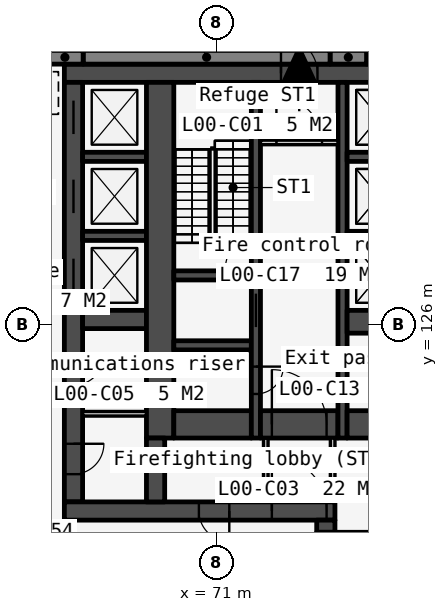
"""IFC4 building model, lengths in metres.
Left out: names, types, materials, properties, quantities, classifications, styles, units other than length and angle.
Written with IfcOpenShell. Run it as: python <this file> out.ifc"""

import sys

from ifc_helpers import new_model, si_unit, direction, frame, frame_2d, origin, place, context, subcontext, project, spatial, polyline, rectangle, outline, extrude, element, fill, save


model = new_model("IFC4")
c1 = context("Model", 3, precision=1e-05, world=origin(), true_north=direction((0.0, 1.0)))
c2 = subcontext(c1, "Body", "Model", "MODEL_VIEW")
j1 = project(units=[si_unit("LENGTHUNIT", "METRE"), si_unit("PLANEANGLEUNIT", "RADIAN")], contexts=[c1])
p1 = place(None, origin())
s1 = spatial("IfcSite", under=j1, at=p1, CompositionType="ELEMENT")
p2 = place(p1, origin())
s2 = spatial("IfcBuilding", under=s1, at=p2, CompositionType="ELEMENT")
p3 = place(p2, origin())
s3 = spatial("IfcBuildingStorey", under=s2, at=p3, CompositionType="ELEMENT", Elevation=0.0)
p4 = place(p3, frame((66.0, 134.25, 0.0), z_axis=(0.0, 0.0, 1.0), x_axis=(1.0, 0.0, 0.0)))
e1 = element("IfcWall", 1, at=p4, inside=s3, PredefinedType="SOLIDWALL", context=c2, shape_type="SweptSolid", body=[
    extrude(rectangle(XDim=28.0, YDim=0.6, at=frame_2d((14.0, 0.0))), origin(), (0.0, 0.0, 1.0), 7.2),
])
p5 = place(p4, frame((7.125, 0.0, 0.0)))
e2 = element("IfcOpeningElement", 2, at=p5, cuts=e1, PredefinedType="OPENING", context=c2, shape_type="SweptSolid", body=[
    extrude(rectangle(XDim=1.2, YDim=2.1, at=frame_2d((0.6, 1.05))), frame((0.0, 0.31, 0.0), z_axis=(0.0, -1.0, 0.0), x_axis=(1.0, 0.0, 0.0)), (0.0, 0.0, 1.0), 0.62),
])
p6 = place(p4, frame((19.675, 0.0, 0.0)))
e3 = element("IfcOpeningElement", 3, at=p6, cuts=e1, PredefinedType="OPENING", context=c2, shape_type="SweptSolid", body=[
    extrude(rectangle(XDim=1.2, YDim=2.1, at=frame_2d((0.6, 1.05))), frame((0.0, 0.31, 0.0), z_axis=(0.0, -1.0, 0.0), x_axis=(1.0, 0.0, 0.0)), (0.0, 0.0, 1.0), 0.62),
])
p7 = place(p4, frame((13.4, 0.0, 0.0)))
e4 = element("IfcOpeningElement", 4, at=p7, cuts=e1, PredefinedType="OPENING", context=c2, shape_type="SweptSolid", body=[
    extrude(rectangle(XDim=1.2, YDim=2.1, at=frame_2d((0.6, 1.05))), frame((0.0, 0.31, 0.0), z_axis=(0.0, -1.0, 0.0), x_axis=(1.0, 0.0, 0.0)), (0.0, 0.0, 1.0), 0.62),
])
p8 = place(p3, frame((66.3, 133.95, 0.0), z_axis=(0.0, 0.0, 1.0), x_axis=(0.0, -1.0, 0.0)))
e5 = element("IfcWall", 5, at=p8, inside=s3, PredefinedType="SOLIDWALL", context=c2, shape_type="SweptSolid", body=[
    extrude(rectangle(XDim=13.8, YDim=0.6, at=frame_2d((6.9, 0.0))), origin(), (0.0, 0.0, 1.0), 7.2),
])
p9 = place(p8, frame((0.6, 0.0, 0.0)))
e6 = element("IfcOpeningElement", 6, at=p9, cuts=e5, PredefinedType="OPENING", context=c2, shape_type="SweptSolid", body=[
    extrude(rectangle(XDim=1.1, YDim=2.1, at=frame_2d((0.55, 1.05))), frame((0.0, 0.31, 0.0), z_axis=(0.0, -1.0, 0.0), x_axis=(1.0, 0.0, 0.0)), (0.0, 0.0, 1.0), 0.62),
])
p10 = place(p8, frame((3.2, 0.0, 0.0)))
e7 = element("IfcOpeningElement", 7, at=p10, cuts=e5, PredefinedType="OPENING", context=c2, shape_type="SweptSolid", body=[
    extrude(rectangle(XDim=1.1, YDim=2.1, at=frame_2d((0.55, 1.05))), frame((0.0, 0.31, 0.0), z_axis=(0.0, -1.0, 0.0), x_axis=(1.0, 0.0, 0.0)), (0.0, 0.0, 1.0), 0.62),
])
p11 = place(p8, frame((5.8, 0.0, 0.0)))
e8 = element("IfcOpeningElement", 8, at=p11, cuts=e5, PredefinedType="OPENING", context=c2, shape_type="SweptSolid", body=[
    extrude(rectangle(XDim=1.1, YDim=2.1, at=frame_2d((0.55, 1.05))), frame((0.0, 0.31, 0.0), z_axis=(0.0, -1.0, 0.0), x_axis=(1.0, 0.0, 0.0)), (0.0, 0.0, 1.0), 0.62),
])
p12 = place(p8, frame((8.963, 0.0, 0.0)))
e9 = element("IfcOpeningElement", 9, at=p12, cuts=e5, PredefinedType="OPENING", context=c2, shape_type="SweptSolid", body=[
    extrude(rectangle(XDim=1.0, YDim=2.1, at=frame_2d((0.5, 1.05))), frame((0.0, 0.31, 0.0), z_axis=(0.0, -1.0, 0.0), x_axis=(1.0, 0.0, 0.0)), (0.0, 0.0, 1.0), 0.62),
])
p13 = place(p8, frame((11.888, 0.0, 0.0)))
e10 = element("IfcOpeningElement", 10, at=p13, cuts=e5, PredefinedType="OPENING", context=c2, shape_type="SweptSolid", body=[
    extrude(rectangle(XDim=1.0, YDim=2.1, at=frame_2d((0.5, 1.05))), frame((0.0, 0.31, 0.0), z_axis=(0.0, -1.0, 0.0), x_axis=(1.0, 0.0, 0.0)), (0.0, 0.0, 1.0), 0.62),
])
p14 = place(p3, frame((66.0, 119.85, 0.0), z_axis=(0.0, 0.0, 1.0), x_axis=(1.0, 0.0, 0.0)))
e11 = element("IfcWall", 11, at=p14, inside=s3, PredefinedType="SOLIDWALL", context=c2, shape_type="SweptSolid", body=[
    extrude(rectangle(XDim=8.9, YDim=0.6, at=frame_2d((4.45, 0.0))), origin(), (0.0, 0.0, 1.0), 7.2),
])
p15 = place(p14, frame((6.825, 0.0, 0.0)))
e12 = element("IfcOpeningElement", 12, at=p15, cuts=e11, PredefinedType="OPENING", context=c2, shape_type="SweptSolid", body=[
    extrude(rectangle(XDim=1.8, YDim=2.1, at=frame_2d((0.9, 1.05))), frame((0.0, 0.31, 0.0), z_axis=(0.0, -1.0, 0.0), x_axis=(1.0, 0.0, 0.0)), (0.0, 0.0, 1.0), 0.62),
])
p16 = place(p14, frame((4.425, 0.0, 0.0)))
e13 = element("IfcOpeningElement", 13, at=p16, cuts=e11, PredefinedType="OPENING", context=c2, shape_type="SweptSolid", body=[
    extrude(rectangle(XDim=1.0, YDim=2.1, at=frame_2d((0.5, 1.05))), frame((0.0, 0.31, 0.0), z_axis=(0.0, -1.0, 0.0), x_axis=(1.0, 0.0, 0.0)), (0.0, 0.0, 1.0), 0.62),
])
for number, where, z_axis, x_axis in (
    (14, (66.6, 131.5, 0.0), (0.0, 0.0, 1.0), (1.0, 0.0, 0.0)),
    (15, (66.6, 128.9, 0.0), (0.0, 0.0, 1.0), (1.0, 0.0, 0.0)),
):
    element("IfcWall", number, at=place(p3, frame(where, z_axis=z_axis, x_axis=x_axis)), inside=s3, PredefinedType="SOLIDWALL", context=c2, shape_type="SweptSolid", body=[
        extrude(rectangle(XDim=2.1, YDim=0.3, at=frame_2d((1.05, 0.0))), origin(), (0.0, 0.0, 1.0), 7.2),
    ])
p17 = place(p3, frame((66.6, 126.15, 0.0), z_axis=(0.0, 0.0, 1.0), x_axis=(1.0, 0.0, 0.0)))
e16 = element("IfcWall", 16, at=p17, inside=s3, PredefinedType="SOLIDWALL", context=c2, shape_type="SweptSolid", body=[
    extrude(rectangle(XDim=2.1, YDim=0.6, at=frame_2d((1.05, 0.0))), origin(), (0.0, 0.0, 1.0), 7.2),
])
p18 = place(p3, frame((66.6, 123.049, 0.0), z_axis=(0.0, 0.0, 1.0), x_axis=(1.0, 0.0, 0.0)))
e17 = element("IfcWall", 17, at=p18, inside=s3, PredefinedType="PARTITIONING", context=c2, shape_type="SweptSolid", body=[
    extrude(rectangle(XDim=2.1, YDim=0.15, at=frame_2d((1.05, 0.0))), origin(), (0.0, 0.0, 1.0), 7.2),
])
p19 = place(p3, frame((69.15, 133.95, 0.0), z_axis=(0.0, 0.0, 1.0), x_axis=(0.0, -1.0, 0.0)))
e18 = element("IfcWall", 18, at=p19, inside=s3, PredefinedType="SOLIDWALL", context=c2, shape_type="SweptSolid", body=[
    extrude(rectangle(XDim=11.7, YDim=0.9, at=frame_2d((5.85, 0.0))), origin(), (0.0, 0.0, 1.0), 7.2),
])
p20 = place(p3, frame((69.0, 122.25, 0.0), z_axis=(0.0, 0.0, 1.0), x_axis=(0.0, -1.0, 0.0)))
e19 = element("IfcWall", 19, at=p20, inside=s3, PredefinedType="SOLIDWALL", context=c2, shape_type="SweptSolid", body=[
    extrude(rectangle(XDim=2.1, YDim=0.6, at=frame_2d((1.05, 0.0))), origin(), (0.0, 0.0, 1.0), 7.2),
])
for number, where, z_axis, x_axis in (
    (20, (69.6, 127.6, 0.0), (0.0, 0.0, 1.0), (1.0, 0.0, 0.0)),
    (21, (69.6, 125.3, 0.0), (0.0, 0.0, 1.0), (1.0, 0.0, 0.0)),
):
    element("IfcWall", number, at=place(p3, frame(where, z_axis=z_axis, x_axis=x_axis)), inside=s3, PredefinedType="SOLIDWALL", context=c2, shape_type="SweptSolid", body=[
        extrude(rectangle(XDim=2.55, YDim=0.3, at=frame_2d((1.275, 0.0))), origin(), (0.0, 0.0, 1.0), 7.2),
    ])
p21 = place(p3, frame((69.6, 122.7, 0.0), z_axis=(0.0, 0.0, 1.0), x_axis=(1.0, 0.0, 0.0)))
e22 = element("IfcWall", 22, at=p21, inside=s3, PredefinedType="SOLIDWALL", context=c2, shape_type="SweptSolid", body=[
    extrude(rectangle(XDim=2.55, YDim=0.9, at=frame_2d((1.275, 0.0))), origin(), (0.0, 0.0, 1.0), 7.2),
])
p22 = place(p3, frame((72.3, 133.95, 0.0), z_axis=(0.0, 0.0, 1.0), x_axis=(0.0, -1.0, 0.0)))
e23 = element("IfcWall", 23, at=p22, inside=s3, PredefinedType="SOLIDWALL", context=c2, shape_type="SweptSolid", body=[
    extrude(rectangle(XDim=11.7, YDim=0.3, at=frame_2d((5.85, 0.0))), origin(), (0.0, 0.0, 1.0), 7.2),
])
p23 = place(p22, frame((6.95, 0.0, 0.0)))
e24 = element("IfcOpeningElement", 24, at=p23, cuts=e23, PredefinedType="OPENING", context=c2, shape_type="SweptSolid", body=[
    extrude(rectangle(XDim=1.1, YDim=2.1, at=frame_2d((0.55, 1.05))), frame((0.0, 0.16, 0.0), z_axis=(0.0, -1.0, 0.0), x_axis=(1.0, 0.0, 0.0)), (0.0, 0.0, 1.0), 0.32),
])
p24 = place(p22, frame((9.35, 0.0, 0.0)))
e25 = element("IfcOpeningElement", 25, at=p24, cuts=e23, PredefinedType="OPENING", context=c2, shape_type="SweptSolid", body=[
    extrude(rectangle(XDim=0.9, YDim=2.1, at=frame_2d((0.45, 1.05))), frame((0.0, 0.16, 0.0), z_axis=(0.0, -1.0, 0.0), x_axis=(1.0, 0.0, 0.0)), (0.0, 0.0, 1.0), 0.32),
])
p25 = place(p22, frame((5.1, 0.0, 0.0)))
e26 = element("IfcOpeningElement", 26, at=p25, cuts=e23, PredefinedType="OPENING", context=c2, shape_type="SweptSolid", body=[
    extrude(rectangle(XDim=1.0, YDim=2.1, at=frame_2d((0.5, 1.05))), frame((0.0, 0.16, 0.0), z_axis=(0.0, -1.0, 0.0), x_axis=(1.0, 0.0, 0.0)), (0.0, 0.0, 1.0), 0.32),
])
p26 = place(p3, frame((72.45, 131.975, 0.0), z_axis=(0.0, 0.0, 1.0), x_axis=(1.0, 0.0, 0.0)))
e27 = element("IfcWall", 27, at=p26, inside=s3, PredefinedType="PARTITIONING", context=c2, shape_type="SweptSolid", body=[
    extrude(rectangle(XDim=2.55, YDim=0.15, at=frame_2d((1.275, 0.0))), origin(), (0.0, 0.0, 1.0), 7.2),
])
p27 = place(p26, frame((0.525, 0.0, 0.0)))
e28 = element("IfcOpeningElement", 28, at=p27, cuts=e27, PredefinedType="OPENING", context=c2, shape_type="SweptSolid", body=[
    extrude(rectangle(XDim=1.5, YDim=2.1, at=frame_2d((0.75, 1.05))), frame((0.0, 0.085, 0.0), z_axis=(0.0, -1.0, 0.0), x_axis=(1.0, 0.0, 0.0)), (0.0, 0.0, 1.0), 0.17),
])
p28 = place(p3, frame((72.45, 122.7, 0.0), z_axis=(0.0, 0.0, 1.0), x_axis=(1.0, 0.0, 0.0)))
e29 = element("IfcWall", 29, at=p28, inside=s3, PredefinedType="SOLIDWALL", context=c2, shape_type="SweptSolid", body=[
    extrude(rectangle(XDim=2.55, YDim=0.9, at=frame_2d((1.275, 0.0))), origin(), (0.0, 0.0, 1.0), 7.2),
])
p29 = place(p28, frame((0.375, 0.0, 0.0)))
e30 = element("IfcOpeningElement", 30, at=p29, cuts=e29, PredefinedType="OPENING", context=c2, shape_type="SweptSolid", body=[
    extrude(rectangle(XDim=1.8, YDim=2.1, at=frame_2d((0.9, 1.05))), frame((0.0, 0.46, 0.0), z_axis=(0.0, -1.0, 0.0), x_axis=(1.0, 0.0, 0.0)), (0.0, 0.0, 1.0), 0.92),
])
p30 = place(p3, frame((72.625, 122.25, 0.0), z_axis=(0.0, 0.0, 1.0), x_axis=(0.0, -1.0, 0.0)))
e31 = element("IfcWall", 31, at=p30, inside=s3, PredefinedType="PARTITIONING", context=c2, shape_type="SweptSolid", body=[
    extrude(rectangle(XDim=2.1, YDim=0.15, at=frame_2d((1.05, 0.0))), origin(), (0.0, 0.0, 1.0), 7.2),
])
p31 = place(p3, frame((74.3, 119.35, 0.0), z_axis=(0.0, 0.0, 1.0), x_axis=(1.0, 0.0, 0.0)))
e32 = element("IfcWall", 32, at=p31, inside=s3, PredefinedType="SOLIDWALL", context=c2, shape_type="SweptSolid", body=[
    extrude(rectangle(XDim=0.6, YDim=0.4, at=frame_2d((0.3, 0.0))), origin(), (0.0, 0.0, 1.0), 7.2),
])
p32 = place(p3, frame((74.3, 118.85, 0.0), z_axis=(0.0, 0.0, 1.0), x_axis=(1.0, 0.0, 0.0)))
e33 = element("IfcWall", 33, at=p32, inside=s3, PredefinedType="SOLIDWALL", context=c2, shape_type="SweptSolid", body=[
    extrude(rectangle(XDim=7.45, YDim=0.6, at=frame_2d((3.725, 0.0))), origin(), (0.0, 0.0, 1.0), 7.2),
])
p33 = place(p32, frame((3.225, 0.0, 0.0)))
e34 = element("IfcOpeningElement", 34, at=p33, cuts=e33, PredefinedType="OPENING", context=c2, shape_type="SweptSolid", body=[
    extrude(rectangle(XDim=1.0, YDim=2.1, at=frame_2d((0.5, 1.05))), frame((0.0, 0.31, 0.0), z_axis=(0.0, -1.0, 0.0), x_axis=(1.0, 0.0, 0.0)), (0.0, 0.0, 1.0), 0.62),
])
p34 = place(p3, frame((74.825, 122.25, 0.0), z_axis=(0.0, 0.0, 1.0), x_axis=(0.0, -1.0, 0.0)))
e35 = element("IfcWall", 35, at=p34, inside=s3, PredefinedType="PARTITIONING", context=c2, shape_type="SweptSolid", body=[
    extrude(rectangle(XDim=2.1, YDim=0.15, at=frame_2d((1.05, 0.0))), origin(), (0.0, 0.0, 1.0), 7.2),
])
p35 = place(p3, frame((75.15, 133.95, 0.0), z_axis=(0.0, 0.0, 1.0), x_axis=(0.0, -1.0, 0.0)))
e36 = element("IfcWall", 36, at=p35, inside=s3, PredefinedType="SOLIDWALL", context=c2, shape_type="SweptSolid", body=[
    extrude(rectangle(XDim=11.7, YDim=0.3, at=frame_2d((5.85, 0.0))), origin(), (0.0, 0.0, 1.0), 7.2),
])
for number, where, z_axis, x_axis in (
    (37, (75.3, 131.5, 0.0), (0.0, 0.0, 1.0), (1.0, 0.0, 0.0)),
    (38, (75.3, 128.9, 0.0), (0.0, 0.0, 1.0), (1.0, 0.0, 0.0)),
):
    element("IfcWall", number, at=place(p3, frame(where, z_axis=z_axis, x_axis=x_axis)), inside=s3, PredefinedType="SOLIDWALL", context=c2, shape_type="SweptSolid", body=[
        extrude(rectangle(XDim=2.1, YDim=0.3, at=frame_2d((1.05, 0.0))), origin(), (0.0, 0.0, 1.0), 7.2),
    ])
p36 = place(p3, frame((75.3, 126.075, 0.0), z_axis=(0.0, 0.0, 1.0), x_axis=(1.0, 0.0, 0.0)))
e39 = element("IfcWall", 39, at=p36, inside=s3, PredefinedType="SOLIDWALL", context=c2, shape_type="SweptSolid", body=[
    extrude(rectangle(XDim=2.1, YDim=0.75, at=frame_2d((1.05, 0.0))), origin(), (0.0, 0.0, 1.0), 7.2),
])
p37 = place(p3, frame((75.3, 122.7, 0.0), z_axis=(0.0, 0.0, 1.0), x_axis=(1.0, 0.0, 0.0)))
e40 = element("IfcWall", 40, at=p37, inside=s3, PredefinedType="SOLIDWALL", context=c2, shape_type="SweptSolid", body=[
    extrude(rectangle(XDim=6.2, YDim=0.9, at=frame_2d((3.1, 0.0))), origin(), (0.0, 0.0, 1.0), 7.2),
])
p38 = place(p3, frame((84.061, 134.775, -0.3), z_axis=(0.0, 0.0, 1.0), x_axis=(-1.0, 0.0, 0.0)))
e41 = element("IfcWall", 41, at=p38, inside=s3, PredefinedType="SOLIDWALL", context=c2, shape_type="SweptSolid", body=[
    extrude(outline(polyline([(0.0, 0.0), (3.461, 0.0), (3.461, 2.4), (4.661, 2.4), (4.661, 0.0), (8.121, 0.0), (8.121, 6.812), (0.0, 6.812), (0.0, 0.0)])), frame((0.0, 0.225, 0.0), z_axis=(0.0, -1.0, 0.0), x_axis=(1.0, 0.0, 0.0)), (0.0, 0.0, 1.0), 0.45),
])
p39 = place(p3, frame((75.939, 134.775, -0.3), z_axis=(0.0, 0.0, 1.0), x_axis=(-1.0, 0.0, 0.0)))
e42 = element("IfcWall", 42, at=p39, inside=s3, PredefinedType="SOLIDWALL", context=c2, shape_type="SweptSolid", body=[
    extrude(rectangle(XDim=1.2, YDim=0.45, at=frame_2d((0.6, 0.0))), origin(), (0.0, 0.0, 1.0), 6.812),
])
p40 = place(p3, frame((74.739, 134.775, -0.3), z_axis=(0.0, 0.0, 1.0), x_axis=(-1.0, 0.0, 0.0)))
e43 = element("IfcWall", 43, at=p40, inside=s3, PredefinedType="SOLIDWALL", context=c2, shape_type="SweptSolid", body=[
    extrude(outline(polyline([(0.0, 0.0), (0.414, 0.0), (0.414, 2.4), (1.614, 2.4), (1.614, 0.0), (8.121, 0.0), (8.121, 6.812), (0.0, 6.812), (0.0, 0.0)])), frame((0.0, 0.225, 0.0), z_axis=(0.0, -1.0, 0.0), x_axis=(1.0, 0.0, 0.0)), (0.0, 0.0, 1.0), 0.45),
])
p41 = place(p3, frame((66.618, 134.775, -0.3), z_axis=(0.0, 0.0, 1.0), x_axis=(-1.0, 0.0, 0.0)))
e44 = element("IfcWall", 44, at=p41, inside=s3, PredefinedType="SOLIDWALL", context=c2, shape_type="SweptSolid", body=[
    extrude(rectangle(XDim=1.2, YDim=0.45, at=frame_2d((0.6, 0.0))), origin(), (0.0, 0.0, 1.0), 6.812),
])
p42 = place(p9, origin())
e45 = element("IfcDoor", 45, at=p42, inside=s3, OperationType="SLIDING_TO_LEFT", PredefinedType="DOOR", context=c2, shape_type="SweptSolid", body=[
    extrude(rectangle(XDim=1.1, YDim=2.1, at=frame_2d((0.55, 1.05))), frame((0.0, 0.025, 0.0), z_axis=(0.0, -1.0, 0.0), x_axis=(1.0, 0.0, 0.0)), (0.0, 0.0, 1.0), 0.05),
])
fill(e6, e45)
p43 = place(p23, origin())
e46 = element("IfcDoor", 46, at=p43, inside=s3, OperationType="SLIDING_TO_LEFT", PredefinedType="DOOR", context=c2, shape_type="SweptSolid", body=[
    extrude(rectangle(XDim=1.1, YDim=2.1, at=frame_2d((0.55, 1.05))), frame((0.0, 0.025, 0.0), z_axis=(0.0, -1.0, 0.0), x_axis=(1.0, 0.0, 0.0)), (0.0, 0.0, 1.0), 0.05),
])
fill(e24, e46)
p44 = place(p29, origin())
e47 = element("IfcDoor", 47, at=p44, inside=s3, OperationType="DOUBLE_DOOR_DOUBLE_SWING", PredefinedType="DOOR", context=c2, shape_type="SweptSolid", body=[
    extrude(rectangle(XDim=1.8, YDim=2.1, at=frame_2d((0.9, 1.05))), frame((0.0, 0.025, 0.0), z_axis=(0.0, -1.0, 0.0), x_axis=(1.0, 0.0, 0.0)), (0.0, 0.0, 1.0), 0.05),
])
fill(e30, e47)
p45 = place(p15, origin())
e48 = element("IfcDoor", 48, at=p45, inside=s3, OperationType="DOUBLE_DOOR_DOUBLE_SWING", PredefinedType="DOOR", context=c2, shape_type="SweptSolid", body=[
    extrude(rectangle(XDim=1.8, YDim=2.1, at=frame_2d((0.9, 1.05))), frame((0.0, 0.025, 0.0), z_axis=(0.0, -1.0, 0.0), x_axis=(1.0, 0.0, 0.0)), (0.0, 0.0, 1.0), 0.05),
])
fill(e12, e48)
p46 = place(p27, origin())
e49 = element("IfcDoor", 49, at=p46, inside=s3, OperationType="DOUBLE_DOOR_DOUBLE_SWING", PredefinedType="DOOR", context=c2, shape_type="SweptSolid", body=[
    extrude(rectangle(XDim=1.5, YDim=2.1, at=frame_2d((0.75, 1.05))), frame((0.0, 0.025, 0.0), z_axis=(0.0, -1.0, 0.0), x_axis=(1.0, 0.0, 0.0)), (0.0, 0.0, 1.0), 0.05),
])
fill(e28, e49)
p47 = place(p24, origin())
e50 = element("IfcDoor", 50, at=p47, inside=s3, OperationType="SINGLE_SWING_LEFT", PredefinedType="DOOR", context=c2, shape_type="SweptSolid", body=[
    extrude(rectangle(XDim=0.9, YDim=2.1, at=frame_2d((0.45, 1.05))), frame((0.0, 0.025, 0.0), z_axis=(0.0, -1.0, 0.0), x_axis=(1.0, 0.0, 0.0)), (0.0, 0.0, 1.0), 0.05),
])
fill(e25, e50)
p48 = place(p16, origin())
e51 = element("IfcDoor", 51, at=p48, inside=s3, OperationType="SINGLE_SWING_RIGHT", PredefinedType="DOOR", context=c2, shape_type="SweptSolid", body=[
    extrude(rectangle(XDim=1.0, YDim=2.1, at=frame_2d((0.5, 1.05))), frame((0.0, 0.025, 0.0), z_axis=(0.0, -1.0, 0.0), x_axis=(1.0, 0.0, 0.0)), (0.0, 0.0, 1.0), 0.05),
])
fill(e13, e51)
p49 = place(p10, origin())
e52 = element("IfcDoor", 52, at=p49, inside=s3, OperationType="SLIDING_TO_LEFT", PredefinedType="DOOR", context=c2, shape_type="SweptSolid", body=[
    extrude(rectangle(XDim=1.1, YDim=2.1, at=frame_2d((0.55, 1.05))), frame((0.0, 0.025, 0.0), z_axis=(0.0, -1.0, 0.0), x_axis=(1.0, 0.0, 0.0)), (0.0, 0.0, 1.0), 0.05),
])
fill(e7, e52)
p50 = place(p11, origin())
e53 = element("IfcDoor", 53, at=p50, inside=s3, OperationType="SLIDING_TO_LEFT", PredefinedType="DOOR", context=c2, shape_type="SweptSolid", body=[
    extrude(rectangle(XDim=1.1, YDim=2.1, at=frame_2d((0.55, 1.05))), frame((0.0, 0.025, 0.0), z_axis=(0.0, -1.0, 0.0), x_axis=(1.0, 0.0, 0.0)), (0.0, 0.0, 1.0), 0.05),
])
fill(e8, e53)
p51 = place(p25, origin())
e54 = element("IfcDoor", 54, at=p51, inside=s3, OperationType="SINGLE_SWING_RIGHT", PredefinedType="DOOR", context=c2, shape_type="SweptSolid", body=[
    extrude(rectangle(XDim=1.0, YDim=2.1, at=frame_2d((0.5, 1.05))), frame((0.0, 0.025, 0.0), z_axis=(0.0, -1.0, 0.0), x_axis=(1.0, 0.0, 0.0)), (0.0, 0.0, 1.0), 0.05),
])
fill(e26, e54)
p52 = place(p12, origin())
e55 = element("IfcDoor", 55, at=p52, inside=s3, OperationType="SINGLE_SWING_LEFT", PredefinedType="DOOR", context=c2, shape_type="SweptSolid", body=[
    extrude(rectangle(XDim=1.0, YDim=2.1, at=frame_2d((0.5, 1.05))), frame((0.0, 0.025, 0.0), z_axis=(0.0, -1.0, 0.0), x_axis=(1.0, 0.0, 0.0)), (0.0, 0.0, 1.0), 0.05),
])
fill(e9, e55)
p53 = place(p13, origin())
e56 = element("IfcDoor", 56, at=p53, inside=s3, OperationType="SINGLE_SWING_LEFT", PredefinedType="DOOR", context=c2, shape_type="SweptSolid", body=[
    extrude(rectangle(XDim=1.0, YDim=2.1, at=frame_2d((0.5, 1.05))), frame((0.0, 0.025, 0.0), z_axis=(0.0, -1.0, 0.0), x_axis=(1.0, 0.0, 0.0)), (0.0, 0.0, 1.0), 0.05),
])
fill(e10, e56)
p54 = place(p5, origin())
e57 = element("IfcDoor", 57, at=p54, inside=s3, OperationType="SINGLE_SWING_LEFT", PredefinedType="DOOR", context=c2, shape_type="SweptSolid", body=[
    extrude(rectangle(XDim=1.2, YDim=2.1, at=frame_2d((0.6, 1.05))), frame((0.0, 0.025, 0.0), z_axis=(0.0, -1.0, 0.0), x_axis=(1.0, 0.0, 0.0)), (0.0, 0.0, 1.0), 0.05),
])
fill(e2, e57)
save(model, sys.argv[1])
